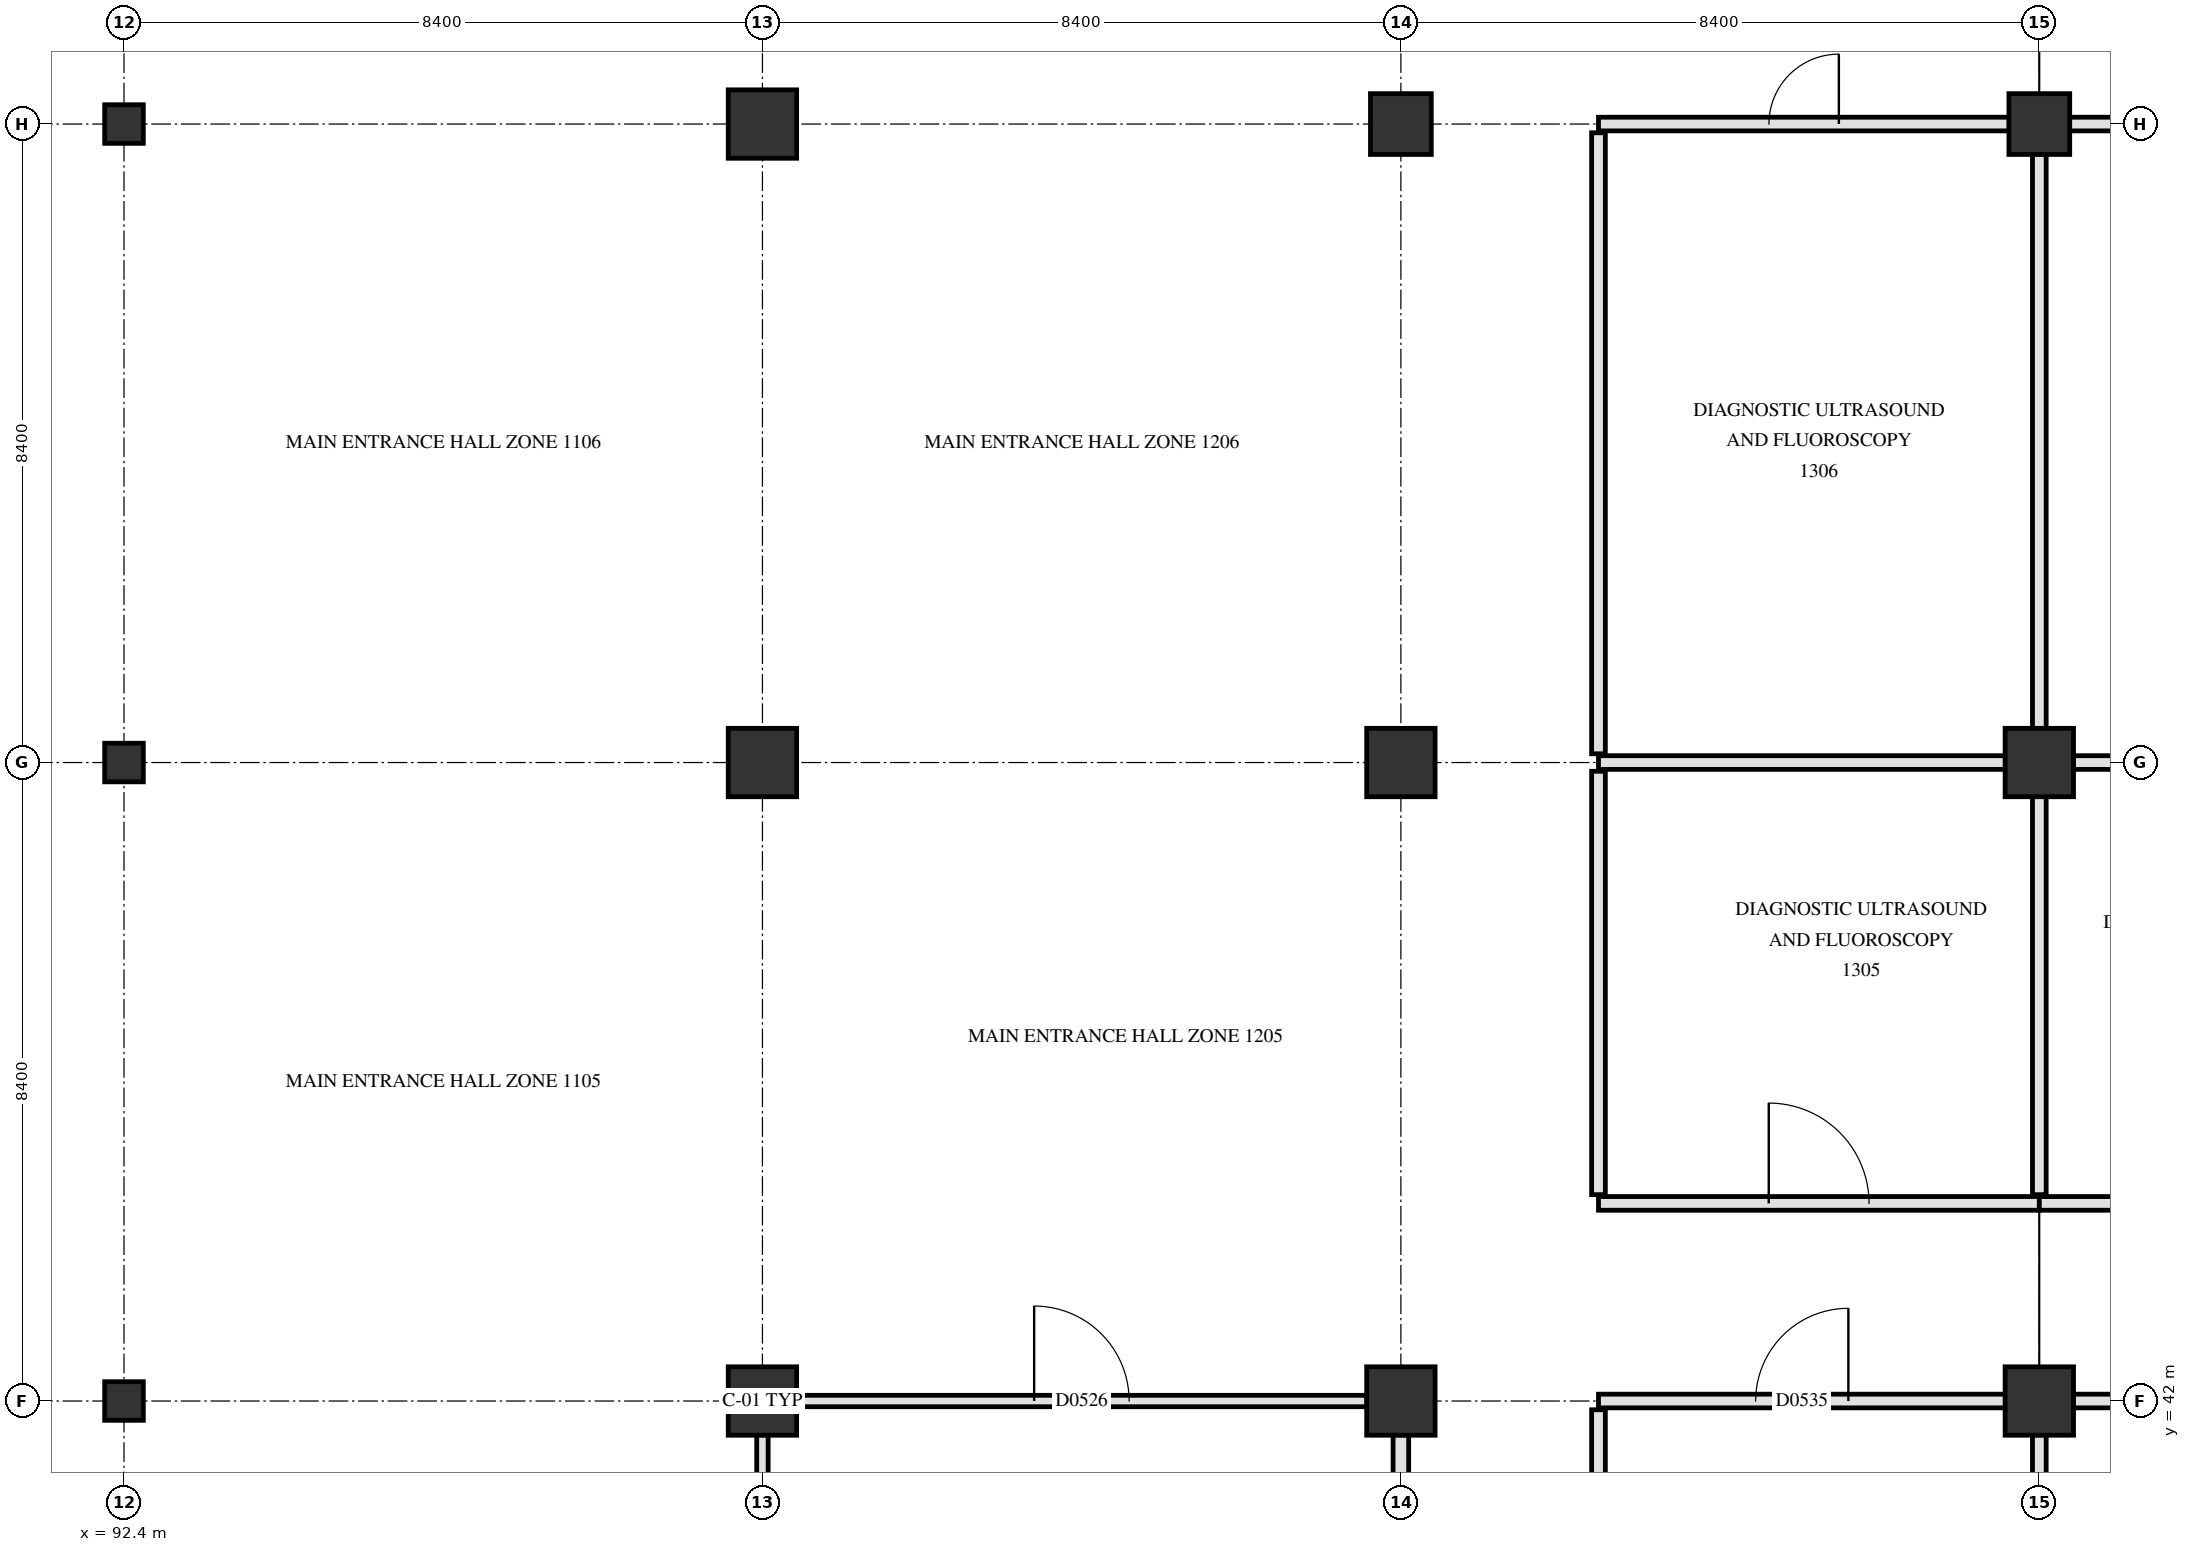
"""IFC4 building model, lengths in metres.
Left out: names, types, materials, properties, quantities, classifications, styles, units other than length and angle.
Written with IfcOpenShell. Run it as: python <this file> out.ifc"""

import sys

from ifc_helpers import new_model, si_unit, direction, frame, frame_2d, origin, origin_2d, place, context, subcontext, project, spatial, rectangle, circle, hollow_circle, extrude, element, fill, save


model = new_model("IFC4")
c1 = context("Model", 3, precision=1e-05, world=origin(), true_north=direction((0.0, 1.0)))
c2 = subcontext(c1, "Body", "Model", "MODEL_VIEW")
j1 = project(units=[si_unit("LENGTHUNIT", "METRE"), si_unit("PLANEANGLEUNIT", "RADIAN")], contexts=[c1])
p1 = place(None, origin())
s1 = spatial("IfcSite", under=j1, at=p1, CompositionType="ELEMENT")
p2 = place(p1, origin())
s2 = spatial("IfcBuilding", under=s1, at=p2, CompositionType="ELEMENT")
p3 = place(p2, origin())
s3 = spatial("IfcBuildingStorey", under=s2, at=p3, CompositionType="ELEMENT", Elevation=0.0)
for number, where, z_axis, x_axis in (
    (1, (92.4, 42.0, 0.0), (0.0, 0.0, 1.0), (1.0, 0.0, 0.0)),
    (2, (92.4, 50.4, 0.0), (0.0, 0.0, 1.0), (1.0, 0.0, 0.0)),
    (3, (92.4, 58.8, 0.0), (0.0, 0.0, 1.0), (1.0, 0.0, 0.0)),
):
    element("IfcColumn", number, at=place(p3, frame(where, z_axis=z_axis, x_axis=x_axis)), inside=s3, PredefinedType="COLUMN", context=c2, shape_type="SweptSolid", body=[
        extrude(hollow_circle(Radius=0.254, WallThickness=0.02, at=origin_2d()), origin(), (0.0, 0.0, 1.0), 4.8),
    ])
for number, where, z_axis, x_axis in (
    (4, (100.8, 42.0, 0.0), (0.0, 0.0, 1.0), (1.0, 0.0, 0.0)),
    (5, (100.8, 50.4, 0.0), (0.0, 0.0, 1.0), (1.0, 0.0, 0.0)),
    (6, (100.8, 58.8, 0.0), (0.0, 0.0, 1.0), (1.0, 0.0, 0.0)),
    (7, (109.2, 42.0, 0.0), (0.0, 0.0, 1.0), (1.0, 0.0, 0.0)),
    (8, (109.2, 50.4, 0.0), (0.0, 0.0, 1.0), (1.0, 0.0, 0.0)),
):
    element("IfcColumn", number, at=place(p3, frame(where, z_axis=z_axis, x_axis=x_axis)), inside=s3, PredefinedType="COLUMN", context=c2, shape_type="SweptSolid", body=[
        extrude(rectangle(XDim=0.9, YDim=0.9, at=origin_2d()), origin(), (0.0, 0.0, 1.0), 4.8),
    ])
p4 = place(p3, frame((109.2, 58.8, 0.0), z_axis=(0.0, 0.0, 1.0), x_axis=(1.0, 0.0, 0.0)))
e9 = element("IfcColumn", 9, at=p4, inside=s3, PredefinedType="COLUMN", context=c2, shape_type="SweptSolid", body=[
    extrude(circle(Radius=0.4, at=origin_2d()), origin(), (0.0, 0.0, 1.0), 4.8),
])
for number, where, z_axis, x_axis in (
    (10, (117.6, 42.0, 0.0), (0.0, 0.0, 1.0), (1.0, 0.0, 0.0)),
    (11, (117.6, 50.4, 0.0), (0.0, 0.0, 1.0), (1.0, 0.0, 0.0)),
):
    element("IfcColumn", number, at=place(p3, frame(where, z_axis=z_axis, x_axis=x_axis)), inside=s3, PredefinedType="COLUMN", context=c2, shape_type="SweptSolid", body=[
        extrude(rectangle(XDim=0.9, YDim=0.9, at=origin_2d()), origin(), (0.0, 0.0, 1.0), 4.8),
    ])
p5 = place(p3, frame((117.6, 58.8, 0.0), z_axis=(0.0, 0.0, 1.0), x_axis=(1.0, 0.0, 0.0)))
e12 = element("IfcColumn", 12, at=p5, inside=s3, PredefinedType="COLUMN", context=c2, shape_type="SweptSolid", body=[
    extrude(circle(Radius=0.4, at=origin_2d()), origin(), (0.0, 0.0, 1.0), 4.8),
])
p6 = place(p3, frame((101.245, 42.0, 0.0), z_axis=(0.0, 0.0, 1.0), x_axis=(1.0, 0.0, 0.0)))
e13 = element("IfcWall", 13, at=p6, inside=s3, PredefinedType="PARTITIONING", context=c2, shape_type="SweptSolid", body=[
    extrude(rectangle(XDim=7.51, YDim=0.15, at=frame_2d((3.755, 0.0))), origin(), (0.0, 0.0, 1.0), 3.84),
])
p7 = place(p6, frame((3.13, 0.0, 0.0)))
e14 = element("IfcOpeningElement", 14, at=p7, cuts=e13, PredefinedType="OPENING", context=c2, shape_type="SweptSolid", body=[
    extrude(rectangle(XDim=1.25, YDim=2.2, at=frame_2d((0.625, 1.1))), frame((0.0, 0.085, 0.0), z_axis=(0.0, -1.0, 0.0), x_axis=(1.0, 0.0, 0.0)), (0.0, 0.0, 1.0), 0.17),
])
p8 = place(p3, frame((111.8, 42.0, 0.0), z_axis=(0.0, 0.0, 1.0), x_axis=(1.0, 0.0, 0.0)))
e15 = element("IfcWall", 15, at=p8, inside=s3, PredefinedType="PARTITIONING", context=c2, shape_type="SweptSolid", body=[
    extrude(rectangle(XDim=5.355, YDim=0.18, at=frame_2d((2.677, 0.0))), origin(), (0.0, 0.0, 1.0), 3.84),
])
p9 = place(p8, frame((2.067, 0.0, 0.0)))
e16 = element("IfcOpeningElement", 16, at=p9, cuts=e15, PredefinedType="OPENING", context=c2, shape_type="SweptSolid", body=[
    extrude(rectangle(XDim=1.22, YDim=2.18, at=frame_2d((0.61, 1.09))), frame((0.0, 0.1, 0.0), z_axis=(0.0, -1.0, 0.0), x_axis=(1.0, 0.0, 0.0)), (0.0, 0.0, 1.0), 0.2),
])
p10 = place(p3, frame((118.045, 42.0, 0.0), z_axis=(0.0, 0.0, 1.0), x_axis=(1.0, 0.0, 0.0)))
e17 = element("IfcWall", 17, at=p10, inside=s3, PredefinedType="PARTITIONING", context=c2, shape_type="SweptSolid", body=[
    extrude(rectangle(XDim=7.66, YDim=0.18, at=frame_2d((3.83, 0.0))), origin(), (0.0, 0.0, 1.0), 3.84),
])
p11 = place(p10, frame((3.03, 0.0, 0.0)))
e18 = element("IfcOpeningElement", 18, at=p11, cuts=e17, PredefinedType="OPENING", context=c2, shape_type="SweptSolid", body=[
    extrude(rectangle(XDim=1.6, YDim=2.25, at=frame_2d((0.8, 1.125))), frame((0.0, 0.1, 0.0), z_axis=(0.0, -1.0, 0.0), x_axis=(1.0, 0.0, 0.0)), (0.0, 0.0, 1.0), 0.2),
])
p12 = place(p3, frame((111.8, 44.6, 0.0), z_axis=(0.0, 0.0, 1.0), x_axis=(1.0, 0.0, 0.0)))
e19 = element("IfcWall", 19, at=p12, inside=s3, PredefinedType="PARTITIONING", context=c2, shape_type="SweptSolid", body=[
    extrude(rectangle(XDim=5.8, YDim=0.18, at=frame_2d((2.9, 0.0))), origin(), (0.0, 0.0, 1.0), 3.89),
])
p13 = place(p12, frame((2.24, 0.0, 0.0)))
e20 = element("IfcOpeningElement", 20, at=p13, cuts=e19, PredefinedType="OPENING", context=c2, shape_type="SweptSolid", body=[
    extrude(rectangle(XDim=1.32, YDim=2.18, at=frame_2d((0.66, 1.09))), frame((0.0, 0.1, 0.0), z_axis=(0.0, -1.0, 0.0), x_axis=(1.0, 0.0, 0.0)), (0.0, 0.0, 1.0), 0.2),
])
p14 = place(p3, frame((117.6, 44.6, 0.0), z_axis=(0.0, 0.0, 1.0), x_axis=(1.0, 0.0, 0.0)))
e21 = element("IfcWall", 21, at=p14, inside=s3, PredefinedType="PARTITIONING", context=c2, shape_type="SweptSolid", body=[
    extrude(rectangle(XDim=8.12, YDim=0.18, at=frame_2d((4.06, 0.0))), origin(), (0.0, 0.0, 1.0), 3.89),
])
p15 = place(p14, frame((3.16, 0.0, 0.0)))
e22 = element("IfcOpeningElement", 22, at=p15, cuts=e21, PredefinedType="OPENING", context=c2, shape_type="SweptSolid", body=[
    extrude(rectangle(XDim=1.8, YDim=2.25, at=frame_2d((0.9, 1.125))), frame((0.0, 0.1, 0.0), z_axis=(0.0, -1.0, 0.0), x_axis=(1.0, 0.0, 0.0)), (0.0, 0.0, 1.0), 0.2),
])
p16 = place(p3, frame((111.8, 50.4, 0.0), z_axis=(0.0, 0.0, 1.0), x_axis=(1.0, 0.0, 0.0)))
e23 = element("IfcWall", 23, at=p16, inside=s3, PredefinedType="PARTITIONING", context=c2, shape_type="SweptSolid", body=[
    extrude(rectangle(XDim=5.355, YDim=0.18, at=frame_2d((2.677, 0.0))), origin(), (0.0, 0.0, 1.0), 3.84),
])
p17 = place(p3, frame((118.045, 50.4, 0.0), z_axis=(0.0, 0.0, 1.0), x_axis=(1.0, 0.0, 0.0)))
e24 = element("IfcWall", 24, at=p17, inside=s3, PredefinedType="PARTITIONING", context=c2, shape_type="SweptSolid", body=[
    extrude(rectangle(XDim=7.66, YDim=0.18, at=frame_2d((3.83, 0.0))), origin(), (0.0, 0.0, 1.0), 3.84),
])
p18 = place(p3, frame((111.8, 58.8, 0.0), z_axis=(0.0, 0.0, 1.0), x_axis=(1.0, 0.0, 0.0)))
e25 = element("IfcWall", 25, at=p18, inside=s3, PredefinedType="PARTITIONING", context=c2, shape_type="SweptSolid", body=[
    extrude(rectangle(XDim=5.405, YDim=0.18, at=frame_2d((2.703, 0.0))), origin(), (0.0, 0.0, 1.0), 3.84),
])
p19 = place(p18, frame((2.242, 0.0, 0.0)))
e26 = element("IfcOpeningElement", 26, at=p19, cuts=e25, PredefinedType="OPENING", context=c2, shape_type="SweptSolid", body=[
    extrude(rectangle(XDim=0.92, YDim=2.08, at=frame_2d((0.46, 1.04))), frame((0.0, 0.1, 0.0), z_axis=(0.0, -1.0, 0.0), x_axis=(1.0, 0.0, 0.0)), (0.0, 0.0, 1.0), 0.2),
])
p20 = place(p3, frame((117.995, 58.8, 0.0), z_axis=(0.0, 0.0, 1.0), x_axis=(1.0, 0.0, 0.0)))
e27 = element("IfcWall", 27, at=p20, inside=s3, PredefinedType="PARTITIONING", context=c2, shape_type="SweptSolid", body=[
    extrude(rectangle(XDim=7.61, YDim=0.18, at=frame_2d((3.805, 0.0))), origin(), (0.0, 0.0, 1.0), 3.84),
])
p21 = place(p20, frame((2.855, 0.0, 0.0)))
e28 = element("IfcOpeningElement", 28, at=p21, cuts=e27, PredefinedType="OPENING", context=c2, shape_type="SweptSolid", body=[
    extrude(rectangle(XDim=1.9, YDim=2.3, at=frame_2d((0.95, 1.15))), frame((0.0, 0.1, 0.0), z_axis=(0.0, -1.0, 0.0), x_axis=(1.0, 0.0, 0.0)), (0.0, 0.0, 1.0), 0.2),
])
p22 = place(p3, frame((100.8, 34.045, 0.0), z_axis=(0.0, 0.0, 1.0), x_axis=(0.0, 1.0, 0.0)))
e29 = element("IfcWall", 29, at=p22, inside=s3, PredefinedType="PARTITIONING", context=c2, shape_type="SweptSolid", body=[
    extrude(rectangle(XDim=7.51, YDim=0.15, at=frame_2d((3.755, 0.0))), origin(), (0.0, 0.0, 1.0), 3.89),
])
p23 = place(p3, frame((109.2, 34.045, 0.0), z_axis=(0.0, 0.0, 1.0), x_axis=(0.0, 1.0, 0.0)))
e30 = element("IfcWall", 30, at=p23, inside=s3, PredefinedType="PARTITIONING", context=c2, shape_type="SweptSolid", body=[
    extrude(rectangle(XDim=7.51, YDim=0.205, at=frame_2d((3.755, 0.0))), origin(), (0.0, 0.0, 1.0), 4.09),
])
p24 = place(p3, frame((111.8, 33.715, 0.0), z_axis=(0.0, 0.0, 1.0), x_axis=(0.0, 1.0, 0.0)))
e31 = element("IfcWall", 31, at=p24, inside=s3, PredefinedType="PARTITIONING", context=c2, shape_type="SweptSolid", body=[
    extrude(rectangle(XDim=8.17, YDim=0.18, at=frame_2d((4.085, 0.0))), origin(), (0.0, 0.0, 1.0), 3.84),
])
p25 = place(p3, frame((111.8, 44.715, 0.0), z_axis=(0.0, 0.0, 1.0), x_axis=(0.0, 1.0, 0.0)))
e32 = element("IfcWall", 32, at=p25, inside=s3, PredefinedType="PARTITIONING", context=c2, shape_type="SweptSolid", body=[
    extrude(rectangle(XDim=5.57, YDim=0.18, at=frame_2d((2.785, 0.0))), origin(), (0.0, 0.0, 1.0), 3.84),
])
p26 = place(p3, frame((111.8, 50.515, 0.0), z_axis=(0.0, 0.0, 1.0), x_axis=(0.0, 1.0, 0.0)))
e33 = element("IfcWall", 33, at=p26, inside=s3, PredefinedType="PARTITIONING", context=c2, shape_type="SweptSolid", body=[
    extrude(rectangle(XDim=8.17, YDim=0.18, at=frame_2d((4.085, 0.0))), origin(), (0.0, 0.0, 1.0), 3.84),
])
p27 = place(p3, frame((117.6, 34.045, 0.0), z_axis=(0.0, 0.0, 1.0), x_axis=(0.0, 1.0, 0.0)))
e34 = element("IfcWall", 34, at=p27, inside=s3, PredefinedType="PARTITIONING", context=c2, shape_type="SweptSolid", body=[
    extrude(rectangle(XDim=7.51, YDim=0.18, at=frame_2d((3.755, 0.0))), origin(), (0.0, 0.0, 1.0), 3.89),
])
p28 = place(p3, frame((117.6, 44.715, 0.0), z_axis=(0.0, 0.0, 1.0), x_axis=(0.0, 1.0, 0.0)))
e35 = element("IfcWall", 35, at=p28, inside=s3, PredefinedType="PARTITIONING", context=c2, shape_type="SweptSolid", body=[
    extrude(rectangle(XDim=5.24, YDim=0.18, at=frame_2d((2.62, 0.0))), origin(), (0.0, 0.0, 1.0), 3.89),
])
p29 = place(p3, frame((117.6, 50.845, 0.0), z_axis=(0.0, 0.0, 1.0), x_axis=(0.0, 1.0, 0.0)))
e36 = element("IfcWall", 36, at=p29, inside=s3, PredefinedType="PARTITIONING", context=c2, shape_type="SweptSolid", body=[
    extrude(rectangle(XDim=7.56, YDim=0.18, at=frame_2d((3.78, 0.0))), origin(), (0.0, 0.0, 1.0), 3.89),
])
p30 = place(p7, origin())
e37 = element("IfcDoor", 37, at=p30, inside=s3, OperationType="SINGLE_SWING_LEFT", PredefinedType="DOOR", context=c2, shape_type="SweptSolid", body=[
    extrude(rectangle(XDim=1.25, YDim=2.2, at=frame_2d((0.625, 1.1))), frame((0.0, 0.025, 0.0), z_axis=(0.0, -1.0, 0.0), x_axis=(1.0, 0.0, 0.0)), (0.0, 0.0, 1.0), 0.05),
])
fill(e14, e37)
p31 = place(p9, origin())
e38 = element("IfcDoor", 38, at=p31, inside=s3, OperationType="SINGLE_SWING_RIGHT", PredefinedType="DOOR", context=c2, shape_type="SweptSolid", body=[
    extrude(rectangle(XDim=1.22, YDim=2.18, at=frame_2d((0.61, 1.09))), frame((0.0, 0.025, 0.0), z_axis=(0.0, -1.0, 0.0), x_axis=(1.0, 0.0, 0.0)), (0.0, 0.0, 1.0), 0.05),
])
fill(e16, e38)
p32 = place(p13, origin())
e39 = element("IfcDoor", 39, at=p32, inside=s3, OperationType="SINGLE_SWING_LEFT", PredefinedType="DOOR", context=c2, shape_type="SweptSolid", body=[
    extrude(rectangle(XDim=1.32, YDim=2.18, at=frame_2d((0.66, 1.09))), frame((0.0, 0.025, 0.0), z_axis=(0.0, -1.0, 0.0), x_axis=(1.0, 0.0, 0.0)), (0.0, 0.0, 1.0), 0.05),
])
fill(e20, e39)
p33 = place(p19, origin())
e40 = element("IfcDoor", 40, at=p33, inside=s3, OperationType="SINGLE_SWING_RIGHT", PredefinedType="DOOR", context=c2, shape_type="SweptSolid", body=[
    extrude(rectangle(XDim=0.92, YDim=2.08, at=frame_2d((0.46, 1.04))), frame((0.0, 0.025, 0.0), z_axis=(0.0, -1.0, 0.0), x_axis=(1.0, 0.0, 0.0)), (0.0, 0.0, 1.0), 0.05),
])
fill(e26, e40)
save(model, sys.argv[1])
